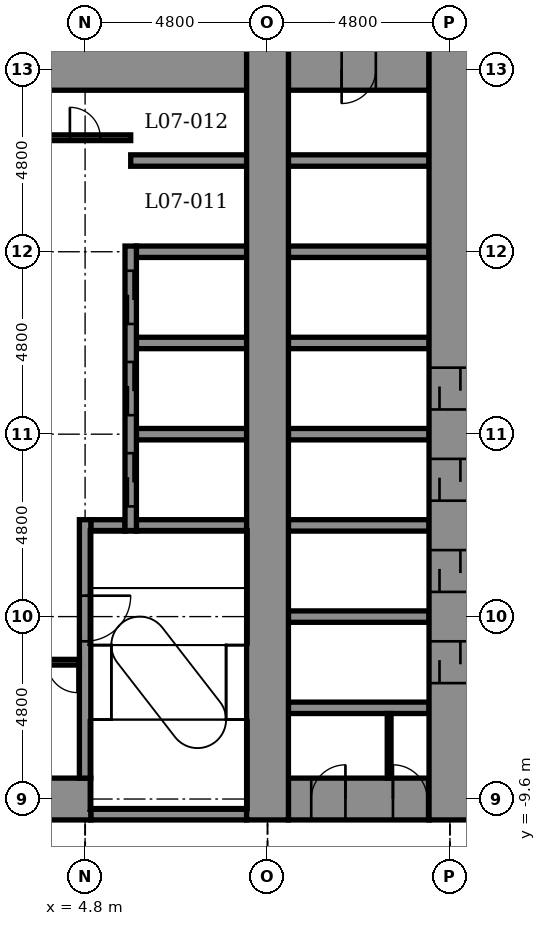
"""IFC4 building model, lengths in metres.
Left out: names, types, materials, properties, quantities, classifications, styles, units other than length and angle.
Written with IfcOpenShell. Run it as: python <this file> out.ifc"""

import sys

from ifc_helpers import new_model, si_unit, direction, frame, frame_2d, origin, place, context, subcontext, project, spatial, rectangle, extrude, element, fill, save


model = new_model("IFC4")
c1 = context("Model", 3, precision=1e-05, world=origin(), true_north=direction((0.0, 1.0)))
c2 = subcontext(c1, "Body", "Model", "MODEL_VIEW")
j1 = project(units=[si_unit("LENGTHUNIT", "METRE"), si_unit("PLANEANGLEUNIT", "RADIAN")], contexts=[c1])
p1 = place(None, origin())
s1 = spatial("IfcSite", under=j1, at=p1, CompositionType="ELEMENT")
p2 = place(p1, origin())
s2 = spatial("IfcBuilding", under=s1, at=p2, CompositionType="ELEMENT")
p3 = place(p2, frame((0.0, 0.0, 38.9)))
s3 = spatial("IfcBuildingStorey", under=s2, at=p3, CompositionType="ELEMENT", Elevation=38.9)
p4 = place(p3, frame((4.95, -10.0, -0.25), z_axis=(0.0, 0.0, 1.0), x_axis=(1.0, 0.0, 0.0)))
e1 = element("IfcWall", 1, at=p4, inside=s3, PredefinedType="STANDARD", context=c2, shape_type="SweptSolid", body=[
    extrude(rectangle(XDim=4.1, YDim=0.3, at=frame_2d((2.05, 0.0))), origin(), (0.0, 0.0, 1.0), 5.5),
])
p5 = place(p3, frame((-5.25, -9.6, -0.25), z_axis=(0.0, 0.0, 1.0), x_axis=(1.0, 0.0, 0.0)))
e2 = element("IfcWall", 2, at=p5, inside=s3, PredefinedType="SHEAR", context=c2, shape_type="SweptSolid", body=[
    extrude(rectangle(XDim=10.2, YDim=1.1, at=frame_2d((5.1, 0.0))), origin(), (0.0, 0.0, 1.0), 5.5),
])
p6 = place(p5, frame((0.6, 0.0, 0.25)))
e3 = element("IfcOpeningElement", 3, at=p6, cuts=e2, PredefinedType="OPENING", context=c2, shape_type="SweptSolid", body=[
    extrude(rectangle(XDim=0.9, YDim=2.1, at=frame_2d((0.45, 1.05))), frame((0.0, 0.56, 0.0), z_axis=(0.0, -1.0, 0.0), x_axis=(1.0, 0.0, 0.0)), (0.0, 0.0, 1.0), 1.12),
])
p7 = place(p3, frame((10.15, -9.6, -0.25), z_axis=(0.0, 0.0, 1.0), x_axis=(1.0, 0.0, 0.0)))
e4 = element("IfcWall", 4, at=p7, inside=s3, PredefinedType="SHEAR", context=c2, shape_type="SweptSolid", body=[
    extrude(rectangle(XDim=3.7, YDim=1.1, at=frame_2d((1.85, 0.0))), origin(), (0.0, 0.0, 1.0), 5.5),
])
p8 = place(p7, frame((0.6, 0.0, 0.25)))
e5 = element("IfcOpeningElement", 5, at=p8, cuts=e4, PredefinedType="OPENING", context=c2, shape_type="SweptSolid", body=[
    extrude(rectangle(XDim=0.9, YDim=2.1, at=frame_2d((0.45, 1.05))), frame((0.0, 0.56, 0.0), z_axis=(0.0, -1.0, 0.0), x_axis=(1.0, 0.0, 0.0)), (0.0, 0.0, 1.0), 1.12),
])
p9 = place(p7, frame((2.75, 0.0, 0.25)))
e6 = element("IfcOpeningElement", 6, at=p9, cuts=e4, PredefinedType="OPENING", context=c2, shape_type="SweptSolid", body=[
    extrude(rectangle(XDim=0.9, YDim=2.1, at=frame_2d((0.45, 1.05))), frame((0.0, 0.56, 0.0), z_axis=(0.0, -1.0, 0.0), x_axis=(1.0, 0.0, 0.0)), (0.0, 0.0, 1.0), 1.12),
])
for number, where, z_axis, x_axis in (
    (7, (10.15, -7.2, -0.25), (0.0, 0.0, 1.0), (1.0, 0.0, 0.0)),
    (8, (10.15, -4.8, -0.25), (0.0, 0.0, 1.0), (1.0, 0.0, 0.0)),
):
    element("IfcWall", number, at=place(p3, frame(where, z_axis=z_axis, x_axis=x_axis)), inside=s3, PredefinedType="STANDARD", context=c2, shape_type="SweptSolid", body=[
        extrude(rectangle(XDim=3.7, YDim=0.3, at=frame_2d((1.85, 0.0))), origin(), (0.0, 0.0, 1.0), 5.5),
    ])
p10 = place(p3, frame((4.95, -2.4, -0.25), z_axis=(0.0, 0.0, 1.0), x_axis=(1.0, 0.0, 0.0)))
e9 = element("IfcWall", 9, at=p10, inside=s3, PredefinedType="STANDARD", context=c2, shape_type="SweptSolid", body=[
    extrude(rectangle(XDim=0.9, YDim=0.3, at=frame_2d((0.45, 0.0))), origin(), (0.0, 0.0, 1.0), 5.5),
])
p11 = place(p3, frame((6.15, -2.4, -0.25), z_axis=(0.0, 0.0, 1.0), x_axis=(1.0, 0.0, 0.0)))
e10 = element("IfcWall", 10, at=p11, inside=s3, PredefinedType="STANDARD", context=c2, shape_type="SweptSolid", body=[
    extrude(rectangle(XDim=2.9, YDim=0.3, at=frame_2d((1.45, 0.0))), origin(), (0.0, 0.0, 1.0), 5.5),
])
p12 = place(p3, frame((10.15, -2.4, -0.25), z_axis=(0.0, 0.0, 1.0), x_axis=(1.0, 0.0, 0.0)))
e11 = element("IfcWall", 11, at=p12, inside=s3, PredefinedType="STANDARD", context=c2, shape_type="SweptSolid", body=[
    extrude(rectangle(XDim=3.7, YDim=0.3, at=frame_2d((1.85, 0.0))), origin(), (0.0, 0.0, 1.0), 5.5),
])
p13 = place(p3, frame((6.15, 0.0, -0.25), z_axis=(0.0, 0.0, 1.0), x_axis=(1.0, 0.0, 0.0)))
e12 = element("IfcWall", 12, at=p13, inside=s3, PredefinedType="STANDARD", context=c2, shape_type="SweptSolid", body=[
    extrude(rectangle(XDim=2.9, YDim=0.3, at=frame_2d((1.45, 0.0))), origin(), (0.0, 0.0, 1.0), 5.5),
])
p14 = place(p3, frame((10.15, 0.0, -0.25), z_axis=(0.0, 0.0, 1.0), x_axis=(1.0, 0.0, 0.0)))
e13 = element("IfcWall", 13, at=p14, inside=s3, PredefinedType="STANDARD", context=c2, shape_type="SweptSolid", body=[
    extrude(rectangle(XDim=3.7, YDim=0.3, at=frame_2d((1.85, 0.0))), origin(), (0.0, 0.0, 1.0), 5.5),
])
p15 = place(p3, frame((6.15, 2.4, -0.25), z_axis=(0.0, 0.0, 1.0), x_axis=(1.0, 0.0, 0.0)))
e14 = element("IfcWall", 14, at=p15, inside=s3, PredefinedType="STANDARD", context=c2, shape_type="SweptSolid", body=[
    extrude(rectangle(XDim=2.9, YDim=0.3, at=frame_2d((1.45, 0.0))), origin(), (0.0, 0.0, 1.0), 5.5),
])
p16 = place(p3, frame((10.15, 2.4, -0.25), z_axis=(0.0, 0.0, 1.0), x_axis=(1.0, 0.0, 0.0)))
e15 = element("IfcWall", 15, at=p16, inside=s3, PredefinedType="STANDARD", context=c2, shape_type="SweptSolid", body=[
    extrude(rectangle(XDim=3.7, YDim=0.3, at=frame_2d((1.85, 0.0))), origin(), (0.0, 0.0, 1.0), 5.5),
])
p17 = place(p3, frame((6.15, 4.8, -0.25), z_axis=(0.0, 0.0, 1.0), x_axis=(1.0, 0.0, 0.0)))
e16 = element("IfcWall", 16, at=p17, inside=s3, PredefinedType="STANDARD", context=c2, shape_type="SweptSolid", body=[
    extrude(rectangle(XDim=2.9, YDim=0.3, at=frame_2d((1.45, 0.0))), origin(), (0.0, 0.0, 1.0), 5.5),
])
p18 = place(p3, frame((10.15, 4.8, -0.25), z_axis=(0.0, 0.0, 1.0), x_axis=(1.0, 0.0, 0.0)))
e17 = element("IfcWall", 17, at=p18, inside=s3, PredefinedType="STANDARD", context=c2, shape_type="SweptSolid", body=[
    extrude(rectangle(XDim=3.7, YDim=0.3, at=frame_2d((1.85, 0.0))), origin(), (0.0, 0.0, 1.0), 5.5),
])
p19 = place(p3, frame((6.0, 7.2, -0.25), z_axis=(0.0, 0.0, 1.0), x_axis=(1.0, 0.0, 0.0)))
e18 = element("IfcWall", 18, at=p19, inside=s3, PredefinedType="STANDARD", context=c2, shape_type="SweptSolid", body=[
    extrude(rectangle(XDim=3.05, YDim=0.3, at=frame_2d((1.525, 0.0))), origin(), (0.0, 0.0, 1.0), 5.5),
])
p20 = place(p3, frame((10.15, 7.2, -0.25), z_axis=(0.0, 0.0, 1.0), x_axis=(1.0, 0.0, 0.0)))
e19 = element("IfcWall", 19, at=p20, inside=s3, PredefinedType="STANDARD", context=c2, shape_type="SweptSolid", body=[
    extrude(rectangle(XDim=3.7, YDim=0.3, at=frame_2d((1.85, 0.0))), origin(), (0.0, 0.0, 1.0), 5.5),
])
p21 = place(p3, frame((-5.25, 9.6, -0.25), z_axis=(0.0, 0.0, 1.0), x_axis=(1.0, 0.0, 0.0)))
e20 = element("IfcWall", 20, at=p21, inside=s3, PredefinedType="SHEAR", context=c2, shape_type="SweptSolid", body=[
    extrude(rectangle(XDim=14.3, YDim=1.1, at=frame_2d((7.15, 0.0))), origin(), (0.0, 0.0, 1.0), 5.5),
])
p22 = place(p21, frame((0.6, 0.0, 0.25)))
e21 = element("IfcOpeningElement", 21, at=p22, cuts=e20, PredefinedType="OPENING", context=c2, shape_type="SweptSolid", body=[
    extrude(rectangle(XDim=0.9, YDim=2.1, at=frame_2d((0.45, 1.05))), frame((0.0, 0.56, 0.0), z_axis=(0.0, -1.0, 0.0), x_axis=(1.0, 0.0, 0.0)), (0.0, 0.0, 1.0), 1.12),
])
p23 = place(p3, frame((10.15, 9.6, -0.25), z_axis=(0.0, 0.0, 1.0), x_axis=(1.0, 0.0, 0.0)))
e22 = element("IfcWall", 22, at=p23, inside=s3, PredefinedType="SHEAR", context=c2, shape_type="SweptSolid", body=[
    extrude(rectangle(XDim=3.7, YDim=1.1, at=frame_2d((1.85, 0.0))), origin(), (0.0, 0.0, 1.0), 5.5),
])
p24 = place(p23, frame((1.4, 0.0, 0.25)))
e23 = element("IfcOpeningElement", 23, at=p24, cuts=e22, PredefinedType="OPENING", context=c2, shape_type="SweptSolid", body=[
    extrude(rectangle(XDim=0.9, YDim=2.1, at=frame_2d((0.45, 1.05))), frame((0.0, 0.56, 0.0), z_axis=(0.0, -1.0, 0.0), x_axis=(1.0, 0.0, 0.0)), (0.0, 0.0, 1.0), 1.12),
])
p25 = place(p3, frame((4.8, -9.05, -0.25), z_axis=(0.0, 0.0, 1.0), x_axis=(0.0, 1.0, 0.0)))
e24 = element("IfcWall", 24, at=p25, inside=s3, PredefinedType="STANDARD", context=c2, shape_type="SweptSolid", body=[
    extrude(rectangle(XDim=6.8, YDim=0.3, at=frame_2d((3.4, 0.0))), origin(), (0.0, 0.0, 1.0), 5.5),
])
p26 = place(p25, frame((3.6, 0.0, 0.25)))
e25 = element("IfcOpeningElement", 25, at=p26, cuts=e24, PredefinedType="OPENING", context=c2, shape_type="SweptSolid", body=[
    extrude(rectangle(XDim=1.2, YDim=2.1, at=frame_2d((0.6, 1.05))), frame((0.0, 0.16, 0.0), z_axis=(0.0, -1.0, 0.0), x_axis=(1.0, 0.0, 0.0)), (0.0, 0.0, 1.0), 0.32),
])
p27 = place(p3, frame((6.0, -2.55, -0.25), z_axis=(0.0, 0.0, 1.0), x_axis=(0.0, 1.0, 0.0)))
e26 = element("IfcWall", 26, at=p27, inside=s3, PredefinedType="STANDARD", context=c2, shape_type="SweptSolid", body=[
    extrude(rectangle(XDim=7.5, YDim=0.3, at=frame_2d((3.75, 0.0))), origin(), (0.0, 0.0, 1.0), 5.5),
])
p28 = place(p27, frame((0.65, 0.0, 0.25)))
e27 = element("IfcOpeningElement", 27, at=p28, cuts=e26, PredefinedType="OPENING", context=c2, shape_type="SweptSolid", body=[
    extrude(rectangle(XDim=1.4, YDim=2.1, at=frame_2d((0.7, 1.05))), frame((0.0, 0.16, 0.0), z_axis=(0.0, -1.0, 0.0), x_axis=(1.0, 0.0, 0.0)), (0.0, 0.0, 1.0), 0.32),
])
p29 = place(p27, frame((3.05, 0.0, 0.25)))
e28 = element("IfcOpeningElement", 28, at=p29, cuts=e26, PredefinedType="OPENING", context=c2, shape_type="SweptSolid", body=[
    extrude(rectangle(XDim=1.4, YDim=2.1, at=frame_2d((0.7, 1.05))), frame((0.0, 0.16, 0.0), z_axis=(0.0, -1.0, 0.0), x_axis=(1.0, 0.0, 0.0)), (0.0, 0.0, 1.0), 0.32),
])
p30 = place(p27, frame((5.45, 0.0, 0.25)))
e29 = element("IfcOpeningElement", 29, at=p30, cuts=e26, PredefinedType="OPENING", context=c2, shape_type="SweptSolid", body=[
    extrude(rectangle(XDim=1.4, YDim=2.1, at=frame_2d((0.7, 1.05))), frame((0.0, 0.16, 0.0), z_axis=(0.0, -1.0, 0.0), x_axis=(1.0, 0.0, 0.0)), (0.0, 0.0, 1.0), 0.32),
])
p31 = place(p3, frame((9.6, -10.15, -0.25), z_axis=(0.0, 0.0, 1.0), x_axis=(0.0, 1.0, 0.0)))
e30 = element("IfcWall", 30, at=p31, inside=s3, PredefinedType="SHEAR", context=c2, shape_type="SweptSolid", body=[
    extrude(rectangle(XDim=20.3, YDim=1.1, at=frame_2d((10.15, 0.0))), origin(), (0.0, 0.0, 1.0), 5.5),
])
p32 = place(p3, frame((14.4, -10.15, -0.25), z_axis=(0.0, 0.0, 1.0), x_axis=(0.0, 1.0, 0.0)))
e31 = element("IfcWall", 31, at=p32, inside=s3, PredefinedType="SHEAR", context=c2, shape_type="SweptSolid", body=[
    extrude(rectangle(XDim=20.3, YDim=1.1, at=frame_2d((10.15, 0.0))), origin(), (0.0, 0.0, 1.0), 5.5),
])
p33 = place(p32, frame((3.6, 0.0, 0.25)))
e32 = element("IfcOpeningElement", 32, at=p33, cuts=e31, PredefinedType="OPENING", context=c2, shape_type="SweptSolid", body=[
    extrude(rectangle(XDim=1.1, YDim=2.1, at=frame_2d((0.55, 1.05))), frame((0.0, 0.56, 0.0), z_axis=(0.0, -1.0, 0.0), x_axis=(1.0, 0.0, 0.0)), (0.0, 0.0, 1.0), 1.12),
])
p34 = place(p32, frame((6.0, 0.0, 0.25)))
e33 = element("IfcOpeningElement", 33, at=p34, cuts=e31, PredefinedType="OPENING", context=c2, shape_type="SweptSolid", body=[
    extrude(rectangle(XDim=1.1, YDim=2.1, at=frame_2d((0.55, 1.05))), frame((0.0, 0.56, 0.0), z_axis=(0.0, -1.0, 0.0), x_axis=(1.0, 0.0, 0.0)), (0.0, 0.0, 1.0), 1.12),
])
p35 = place(p32, frame((8.4, 0.0, 0.25)))
e34 = element("IfcOpeningElement", 34, at=p35, cuts=e31, PredefinedType="OPENING", context=c2, shape_type="SweptSolid", body=[
    extrude(rectangle(XDim=1.1, YDim=2.1, at=frame_2d((0.55, 1.05))), frame((0.0, 0.56, 0.0), z_axis=(0.0, -1.0, 0.0), x_axis=(1.0, 0.0, 0.0)), (0.0, 0.0, 1.0), 1.12),
])
p36 = place(p32, frame((10.8, 0.0, 0.25)))
e35 = element("IfcOpeningElement", 35, at=p36, cuts=e31, PredefinedType="OPENING", context=c2, shape_type="SweptSolid", body=[
    extrude(rectangle(XDim=1.1, YDim=2.1, at=frame_2d((0.55, 1.05))), frame((0.0, 0.56, 0.0), z_axis=(0.0, -1.0, 0.0), x_axis=(1.0, 0.0, 0.0)), (0.0, 0.0, 1.0), 1.12),
])
p37 = place(p3, frame((12.8, -9.05, 0.0), z_axis=(0.0, 0.0, 1.0), x_axis=(0.0, 1.0, 0.0)))
e36 = element("IfcWall", 36, at=p37, inside=s3, PredefinedType="PARTITIONING", context=c2, shape_type="SweptSolid", body=[
    extrude(rectangle(XDim=1.7, YDim=0.1, at=frame_2d((0.85, 0.0))), origin(), (0.0, 0.0, 1.0), 5.25),
])
p38 = place(p3, frame((3.75, -6.0, 0.0), z_axis=(0.0, 0.0, 1.0), x_axis=(1.0, 0.0, 0.0)))
e37 = element("IfcWall", 37, at=p38, inside=s3, PredefinedType="PARTITIONING", context=c2, shape_type="SweptSolid", body=[
    extrude(rectangle(XDim=0.9, YDim=0.15, at=frame_2d((0.45, 0.0))), origin(), (0.0, 0.0, 1.0), 5.25),
])
p39 = place(p38, frame((0.05, 0.0, 0.0)))
e38 = element("IfcOpeningElement", 38, at=p39, cuts=e37, PredefinedType="OPENING", context=c2, shape_type="SweptSolid", body=[
    extrude(rectangle(XDim=0.8, YDim=2.1, at=frame_2d((0.4, 1.05))), frame((0.0, 0.085, 0.0), z_axis=(0.0, -1.0, 0.0), x_axis=(1.0, 0.0, 0.0)), (0.0, 0.0, 1.0), 0.17),
])
p40 = place(p3, frame((3.75, 7.8, 0.0), z_axis=(0.0, 0.0, 1.0), x_axis=(1.0, 0.0, 0.0)))
e39 = element("IfcWall", 39, at=p40, inside=s3, PredefinedType="PARTITIONING", context=c2, shape_type="SweptSolid", body=[
    extrude(rectangle(XDim=2.25, YDim=0.15, at=frame_2d((1.125, 0.0))), origin(), (0.0, 0.0, 1.0), 5.25),
])
p41 = place(p40, frame((0.65, 0.0, 0.0)))
e40 = element("IfcOpeningElement", 40, at=p41, cuts=e39, PredefinedType="OPENING", context=c2, shape_type="SweptSolid", body=[
    extrude(rectangle(XDim=0.8, YDim=2.1, at=frame_2d((0.4, 1.05))), frame((0.0, 0.085, 0.0), z_axis=(0.0, -1.0, 0.0), x_axis=(1.0, 0.0, 0.0)), (0.0, 0.0, 1.0), 0.17),
])
p42 = place(p41, origin())
e41 = element("IfcDoor", 41, at=p42, inside=s3, OperationType="SINGLE_SWING_LEFT", PredefinedType="DOOR", context=c2, shape_type="SweptSolid", body=[
    extrude(rectangle(XDim=0.8, YDim=2.1, at=frame_2d((0.4, 1.05))), frame((0.0, 0.025, 0.0), z_axis=(0.0, -1.0, 0.0), x_axis=(1.0, 0.0, 0.0)), (0.0, 0.0, 1.0), 0.05),
])
fill(e40, e41)
p43 = place(p39, frame((0.8, 0.0, 0.0), z_axis=(0.0, 0.0, 1.0), x_axis=(-1.0, 0.0, 0.0)))
e42 = element("IfcDoor", 42, at=p43, inside=s3, OperationType="SINGLE_SWING_RIGHT", PredefinedType="DOOR", context=c2, shape_type="SweptSolid", body=[
    extrude(rectangle(XDim=0.8, YDim=2.1, at=frame_2d((0.4, 1.05))), frame((0.0, 0.025, 0.0), z_axis=(0.0, -1.0, 0.0), x_axis=(1.0, 0.0, 0.0)), (0.0, 0.0, 1.0), 0.05),
])
fill(e38, e42)
p44 = place(p28, origin())
e43 = element("IfcDoor", 43, at=p44, inside=s3, OperationType="DOUBLE_DOOR_SLIDING", PredefinedType="DOOR", context=c2, shape_type="SweptSolid", body=[
    extrude(rectangle(XDim=1.4, YDim=2.1, at=frame_2d((0.7, 1.05))), frame((0.0, 0.025, 0.0), z_axis=(0.0, -1.0, 0.0), x_axis=(1.0, 0.0, 0.0)), (0.0, 0.0, 1.0), 0.05),
])
fill(e27, e43)
p45 = place(p29, origin())
e44 = element("IfcDoor", 44, at=p45, inside=s3, OperationType="DOUBLE_DOOR_SLIDING", PredefinedType="DOOR", context=c2, shape_type="SweptSolid", body=[
    extrude(rectangle(XDim=1.4, YDim=2.1, at=frame_2d((0.7, 1.05))), frame((0.0, 0.025, 0.0), z_axis=(0.0, -1.0, 0.0), x_axis=(1.0, 0.0, 0.0)), (0.0, 0.0, 1.0), 0.05),
])
fill(e28, e44)
p46 = place(p30, origin())
e45 = element("IfcDoor", 45, at=p46, inside=s3, OperationType="DOUBLE_DOOR_SLIDING", PredefinedType="DOOR", context=c2, shape_type="SweptSolid", body=[
    extrude(rectangle(XDim=1.4, YDim=2.1, at=frame_2d((0.7, 1.05))), frame((0.0, 0.025, 0.0), z_axis=(0.0, -1.0, 0.0), x_axis=(1.0, 0.0, 0.0)), (0.0, 0.0, 1.0), 0.05),
])
fill(e29, e45)
p47 = place(p33, origin())
e46 = element("IfcDoor", 46, at=p47, inside=s3, OperationType="DOUBLE_DOOR_SLIDING", PredefinedType="DOOR", context=c2, shape_type="SweptSolid", body=[
    extrude(rectangle(XDim=1.1, YDim=2.1, at=frame_2d((0.55, 1.05))), frame((0.0, 0.025, 0.0), z_axis=(0.0, -1.0, 0.0), x_axis=(1.0, 0.0, 0.0)), (0.0, 0.0, 1.0), 0.05),
])
fill(e32, e46)
p48 = place(p34, origin())
e47 = element("IfcDoor", 47, at=p48, inside=s3, OperationType="DOUBLE_DOOR_SLIDING", PredefinedType="DOOR", context=c2, shape_type="SweptSolid", body=[
    extrude(rectangle(XDim=1.1, YDim=2.1, at=frame_2d((0.55, 1.05))), frame((0.0, 0.025, 0.0), z_axis=(0.0, -1.0, 0.0), x_axis=(1.0, 0.0, 0.0)), (0.0, 0.0, 1.0), 0.05),
])
fill(e33, e47)
p49 = place(p35, origin())
e48 = element("IfcDoor", 48, at=p49, inside=s3, OperationType="DOUBLE_DOOR_SLIDING", PredefinedType="DOOR", context=c2, shape_type="SweptSolid", body=[
    extrude(rectangle(XDim=1.1, YDim=2.1, at=frame_2d((0.55, 1.05))), frame((0.0, 0.025, 0.0), z_axis=(0.0, -1.0, 0.0), x_axis=(1.0, 0.0, 0.0)), (0.0, 0.0, 1.0), 0.05),
])
fill(e34, e48)
p50 = place(p36, origin())
e49 = element("IfcDoor", 49, at=p50, inside=s3, OperationType="DOUBLE_DOOR_SLIDING", PredefinedType="DOOR", context=c2, shape_type="SweptSolid", body=[
    extrude(rectangle(XDim=1.1, YDim=2.1, at=frame_2d((0.55, 1.05))), frame((0.0, 0.025, 0.0), z_axis=(0.0, -1.0, 0.0), x_axis=(1.0, 0.0, 0.0)), (0.0, 0.0, 1.0), 0.05),
])
fill(e35, e49)
p51 = place(p26, frame((1.2, 0.0, 0.0), z_axis=(0.0, 0.0, 1.0), x_axis=(-1.0, 0.0, 0.0)))
e50 = element("IfcDoor", 50, at=p51, inside=s3, OperationType="SINGLE_SWING_RIGHT", PredefinedType="DOOR", context=c2, shape_type="SweptSolid", body=[
    extrude(rectangle(XDim=1.2, YDim=2.1, at=frame_2d((0.6, 1.05))), frame((0.0, 0.025, 0.0), z_axis=(0.0, -1.0, 0.0), x_axis=(1.0, 0.0, 0.0)), (0.0, 0.0, 1.0), 0.05),
])
fill(e25, e50)
p52 = place(p8, origin())
e51 = element("IfcDoor", 51, at=p52, inside=s3, OperationType="SINGLE_SWING_RIGHT", PredefinedType="DOOR", context=c2, shape_type="SweptSolid", body=[
    extrude(rectangle(XDim=0.9, YDim=2.1, at=frame_2d((0.45, 1.05))), frame((0.0, 0.025, 0.0), z_axis=(0.0, -1.0, 0.0), x_axis=(1.0, 0.0, 0.0)), (0.0, 0.0, 1.0), 0.05),
])
fill(e5, e51)
p53 = place(p9, origin())
e52 = element("IfcDoor", 52, at=p53, inside=s3, OperationType="SINGLE_SWING_LEFT", PredefinedType="DOOR", context=c2, shape_type="SweptSolid", body=[
    extrude(rectangle(XDim=0.9, YDim=2.1, at=frame_2d((0.45, 1.05))), frame((0.0, 0.025, 0.0), z_axis=(0.0, -1.0, 0.0), x_axis=(1.0, 0.0, 0.0)), (0.0, 0.0, 1.0), 0.05),
])
fill(e6, e52)
p54 = place(p24, frame((0.9, 0.0, 0.0), z_axis=(0.0, 0.0, 1.0), x_axis=(-1.0, 0.0, 0.0)))
e53 = element("IfcDoor", 53, at=p54, inside=s3, OperationType="SINGLE_SWING_LEFT", PredefinedType="DOOR", context=c2, shape_type="SweptSolid", body=[
    extrude(rectangle(XDim=0.9, YDim=2.1, at=frame_2d((0.45, 1.05))), frame((0.0, 0.025, 0.0), z_axis=(0.0, -1.0, 0.0), x_axis=(1.0, 0.0, 0.0)), (0.0, 0.0, 1.0), 0.05),
])
fill(e23, e53)
save(model, sys.argv[1])
